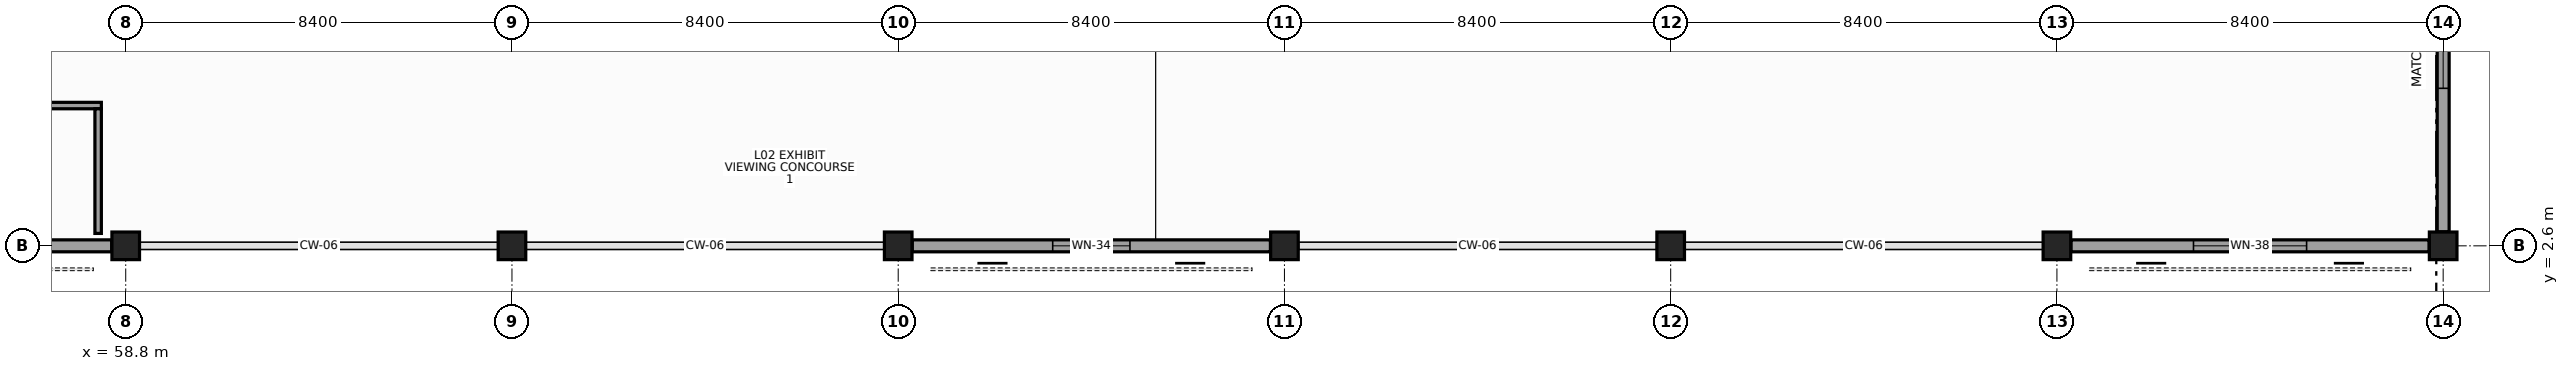
"""IFC4 building model, lengths in metres.
Left out: names, types, materials, properties, quantities, classifications, styles, units other than length and angle.
Written with IfcOpenShell. Run it as: python <this file> out.ifc"""

import sys

from ifc_helpers import new_model, si_unit, direction, frame, frame_2d, origin, origin_2d, place, context, subcontext, project, spatial, rectangle, extrude, element, fill, save


model = new_model("IFC4")
c1 = context("Model", 3, precision=1e-05, world=origin(), true_north=direction((0.0, 1.0)))
c2 = subcontext(c1, "Body", "Model", "MODEL_VIEW")
j1 = project(units=[si_unit("LENGTHUNIT", "METRE"), si_unit("PLANEANGLEUNIT", "RADIAN")], contexts=[c1])
p1 = place(None, origin())
s1 = spatial("IfcSite", under=j1, at=p1, CompositionType="ELEMENT")
p2 = place(p1, origin())
s2 = spatial("IfcBuilding", under=s1, at=p2, CompositionType="ELEMENT")
p3 = place(p2, frame((0.0, 0.0, 10.8)))
s3 = spatial("IfcBuildingStorey", under=s2, at=p3, CompositionType="ELEMENT", Elevation=10.8)
for number, where, z_axis, x_axis in (
    (1, (58.8, 2.6, 0.0), (0.0, 0.0, 1.0), (1.0, 0.0, 0.0)),
    (2, (67.2, 2.6, 0.0), (0.0, 0.0, 1.0), (1.0, 0.0, 0.0)),
    (3, (75.6, 2.6, 0.0), (0.0, 0.0, 1.0), (1.0, 0.0, 0.0)),
    (4, (84.0, 2.6, 0.0), (0.0, 0.0, 1.0), (1.0, 0.0, 0.0)),
    (5, (92.4, 2.6, 0.0), (0.0, 0.0, 1.0), (1.0, 0.0, 0.0)),
    (6, (100.8, 2.6, 0.0), (0.0, 0.0, 1.0), (1.0, 0.0, 0.0)),
    (7, (109.2, 2.6, 0.0), (0.0, 0.0, 1.0), (1.0, 0.0, 0.0)),
):
    element("IfcColumn", number, at=place(p3, frame(where, z_axis=z_axis, x_axis=x_axis)), inside=s3, PredefinedType="COLUMN", context=c2, shape_type="SweptSolid", body=[
        extrude(rectangle(XDim=0.6, YDim=0.6, at=origin_2d()), origin(), (0.0, 0.0, 1.0), 4.8),
    ])
p4 = place(p3, frame((50.705, 2.6, 0.0), z_axis=(0.0, 0.0, 1.0), x_axis=(1.0, 0.0, 0.0)))
e8 = element("IfcWall", 8, at=p4, inside=s3, PredefinedType="STANDARD", context=c2, shape_type="SweptSolid", body=[
    extrude(rectangle(XDim=7.79, YDim=0.26, at=frame_2d((3.895, 0.0))), origin(), (0.0, 0.0, 1.0), 3.63),
])
p5 = place(p4, frame((2.82, 0.0, 0.95)))
e9 = element("IfcOpeningElement", 9, at=p5, cuts=e8, PredefinedType="OPENING", context=c2, shape_type="SweptSolid", body=[
    extrude(rectangle(XDim=2.15, YDim=2.3, at=frame_2d((1.075, 1.15))), frame((0.0, 0.14, 0.0), z_axis=(0.0, -1.0, 0.0), x_axis=(1.0, 0.0, 0.0)), (0.0, 0.0, 1.0), 0.28),
])
p6 = place(p3, frame((75.905, 2.6, 0.0), z_axis=(0.0, 0.0, 1.0), x_axis=(1.0, 0.0, 0.0)))
e10 = element("IfcWall", 10, at=p6, inside=s3, PredefinedType="STANDARD", context=c2, shape_type="SweptSolid", body=[
    extrude(rectangle(XDim=7.79, YDim=0.26, at=frame_2d((3.895, 0.0))), origin(), (0.0, 0.0, 1.0), 3.63),
])
p7 = place(p6, frame((3.055, 0.0, 0.95)))
e11 = element("IfcOpeningElement", 11, at=p7, cuts=e10, PredefinedType="OPENING", context=c2, shape_type="SweptSolid", body=[
    extrude(rectangle(XDim=1.68, YDim=2.08, at=frame_2d((0.84, 1.04))), frame((0.0, 0.14, 0.0), z_axis=(0.0, -1.0, 0.0), x_axis=(1.0, 0.0, 0.0)), (0.0, 0.0, 1.0), 0.28),
])
p8 = place(p3, frame((101.105, 2.6, 0.0), z_axis=(0.0, 0.0, 1.0), x_axis=(1.0, 0.0, 0.0)))
e12 = element("IfcWall", 12, at=p8, inside=s3, PredefinedType="STANDARD", context=c2, shape_type="SweptSolid", body=[
    extrude(rectangle(XDim=7.79, YDim=0.26, at=frame_2d((3.895, 0.0))), origin(), (0.0, 0.0, 1.0), 3.63),
])
p9 = place(p8, frame((2.665, 0.0, 0.95)))
e13 = element("IfcOpeningElement", 13, at=p9, cuts=e12, PredefinedType="OPENING", context=c2, shape_type="SweptSolid", body=[
    extrude(rectangle(XDim=2.46, YDim=2.14, at=frame_2d((1.23, 1.07))), frame((0.0, 0.14, 0.0), z_axis=(0.0, -1.0, 0.0), x_axis=(1.0, 0.0, 0.0)), (0.0, 0.0, 1.0), 0.28),
])
p10 = place(p3, frame((109.2, 2.905, 0.0), z_axis=(0.0, 0.0, 1.0), x_axis=(0.0, 1.0, 0.0)))
e14 = element("IfcWall", 14, at=p10, inside=s3, PredefinedType="STANDARD", context=c2, shape_type="SweptSolid", body=[
    extrude(rectangle(XDim=8.39, YDim=0.26, at=frame_2d((4.195, 0.0))), origin(), (0.0, 0.0, 1.0), 3.65),
])
p11 = place(p10, frame((3.12, 0.0, 0.95)))
e15 = element("IfcOpeningElement", 15, at=p11, cuts=e14, PredefinedType="OPENING", context=c2, shape_type="SweptSolid", body=[
    extrude(rectangle(XDim=2.15, YDim=2.3, at=frame_2d((1.075, 1.15))), frame((0.0, 0.14, 0.0), z_axis=(0.0, -1.0, 0.0), x_axis=(1.0, 0.0, 0.0)), (0.0, 0.0, 1.0), 0.28),
])
p12 = place(p3, frame((33.93, 5.65, 0.0), z_axis=(0.0, 0.0, 1.0), x_axis=(1.0, 0.0, 0.0)))
e16 = element("IfcWall", 16, at=p12, inside=s3, PredefinedType="PARTITIONING", context=c2, shape_type="SweptSolid", body=[
    extrude(rectangle(XDim=24.34, YDim=0.14, at=frame_2d((12.17, 0.0))), origin(), (0.0, 0.0, 1.0), 3.75),
])
p13 = place(p12, frame((11.31, 0.0, 0.0)))
e17 = element("IfcOpeningElement", 17, at=p13, cuts=e16, PredefinedType="OPENING", context=c2, shape_type="SweptSolid", body=[
    extrude(rectangle(XDim=1.72, YDim=2.35, at=frame_2d((0.86, 1.175))), frame((0.0, 0.08, 0.0), z_axis=(0.0, -1.0, 0.0), x_axis=(1.0, 0.0, 0.0)), (0.0, 0.0, 1.0), 0.16),
])
p14 = place(p12, frame((13.63, 0.0, 1.05)))
e18 = element("IfcOpeningElement", 18, at=p14, cuts=e16, PredefinedType="OPENING", context=c2, shape_type="SweptSolid", body=[
    extrude(rectangle(XDim=2.05, YDim=1.42, at=frame_2d((1.025, 0.71))), frame((0.0, 0.08, 0.0), z_axis=(0.0, -1.0, 0.0), x_axis=(1.0, 0.0, 0.0)), (0.0, 0.0, 1.0), 0.16),
])
p15 = place(p3, frame((58.2, 2.87, 0.0), z_axis=(0.0, 0.0, 1.0), x_axis=(0.0, 1.0, 0.0)))
e19 = element("IfcWall", 19, at=p15, inside=s3, PredefinedType="PARTITIONING", context=c2, shape_type="SweptSolid", body=[
    extrude(rectangle(XDim=2.71, YDim=0.14, at=frame_2d((1.355, 0.0))), origin(), (0.0, 0.0, 1.0), 3.63),
])
p16 = place(p7, origin())
e20 = element("IfcWindow", 20, at=p16, inside=s3, PartitioningType="SINGLE_PANEL", PredefinedType="WINDOW", context=c2, shape_type="SweptSolid", body=[
    extrude(rectangle(XDim=1.68, YDim=2.08, at=frame_2d((0.84, 1.04))), frame((0.0, 0.03, 0.0), z_axis=(0.0, -1.0, 0.0), x_axis=(1.0, 0.0, 0.0)), (0.0, 0.0, 1.0), 0.06),
])
fill(e11, e20)
p17 = place(p9, origin())
e21 = element("IfcWindow", 21, at=p17, inside=s3, PartitioningType="SINGLE_PANEL", PredefinedType="WINDOW", context=c2, shape_type="SweptSolid", body=[
    extrude(rectangle(XDim=2.46, YDim=2.14, at=frame_2d((1.23, 1.07))), frame((0.0, 0.03, 0.0), z_axis=(0.0, -1.0, 0.0), x_axis=(1.0, 0.0, 0.0)), (0.0, 0.0, 1.0), 0.06),
])
fill(e13, e21)
p18 = place(p11, origin())
e22 = element("IfcWindow", 22, at=p18, inside=s3, PartitioningType="SINGLE_PANEL", PredefinedType="WINDOW", context=c2, shape_type="SweptSolid", body=[
    extrude(rectangle(XDim=2.15, YDim=2.3, at=frame_2d((1.075, 1.15))), frame((0.0, 0.03, 0.0), z_axis=(0.0, -1.0, 0.0), x_axis=(1.0, 0.0, 0.0)), (0.0, 0.0, 1.0), 0.06),
])
fill(e15, e22)
save(model, sys.argv[1])
